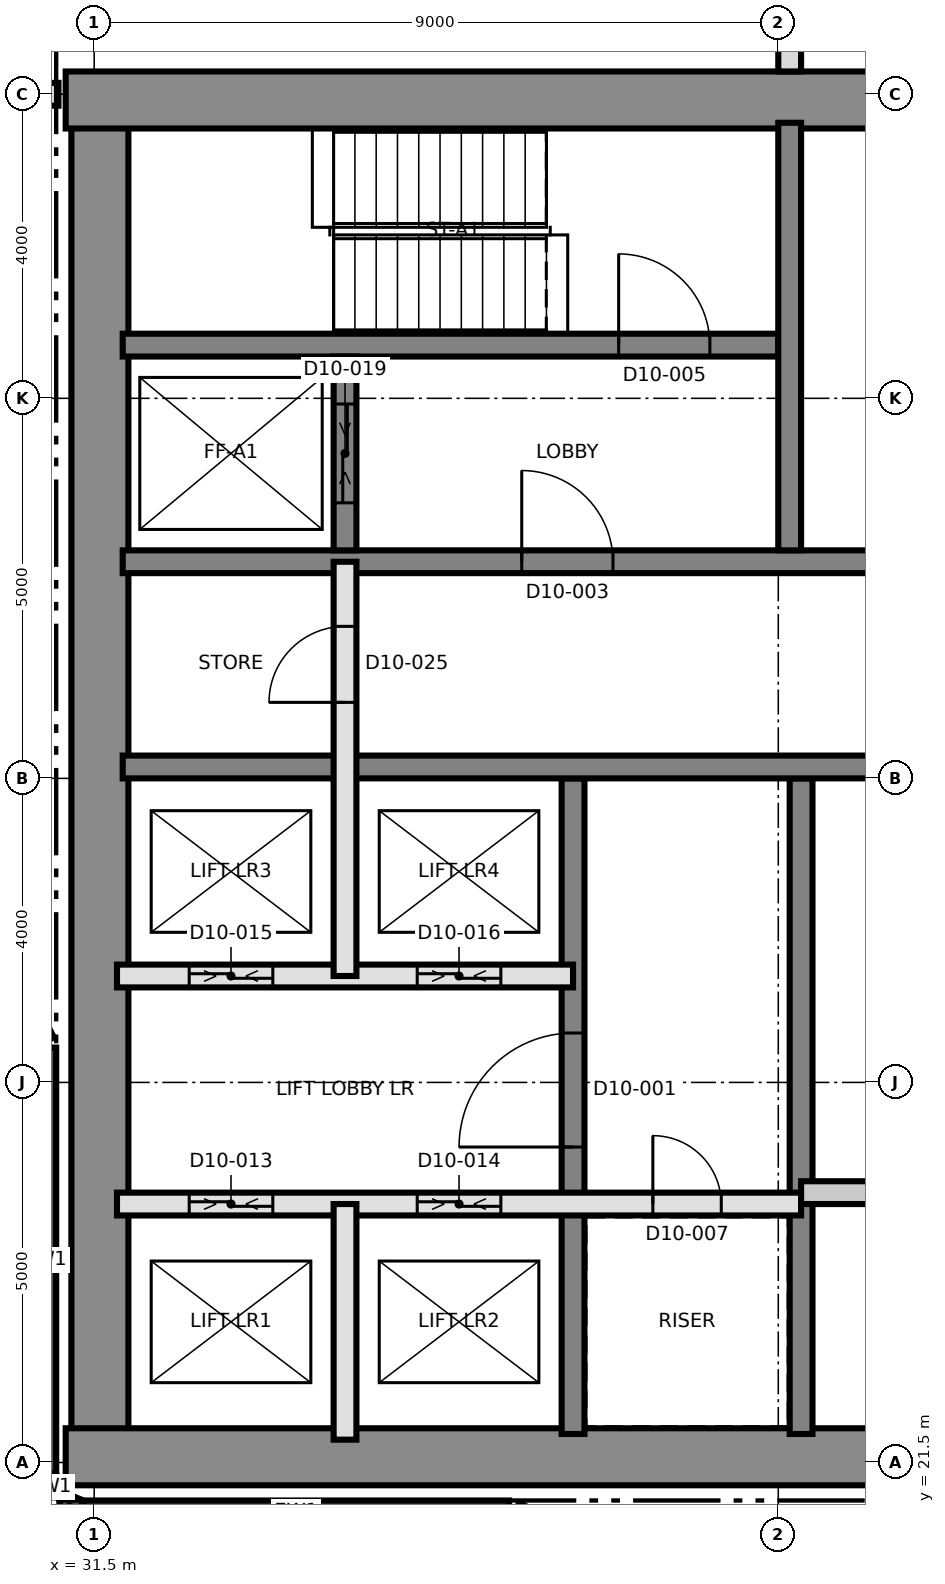
"""IFC4 building model, lengths in metres.
Left out: names, types, materials, properties, quantities, classifications, styles, units other than length and angle.
Written with IfcOpenShell. Run it as: python <this file> out.ifc"""

import sys

from ifc_helpers import new_model, si_unit, direction, frame, frame_2d, origin, place, context, subcontext, project, spatial, rectangle, extrude, element, fill, save


model = new_model("IFC4")
c1 = context("Model", 3, precision=1e-05, world=origin(), true_north=direction((0.0, 1.0)))
c2 = subcontext(c1, "Body", "Model", "MODEL_VIEW")
j1 = project(units=[si_unit("LENGTHUNIT", "METRE"), si_unit("PLANEANGLEUNIT", "RADIAN")], contexts=[c1])
p1 = place(None, origin())
s1 = spatial("IfcSite", under=j1, at=p1, CompositionType="ELEMENT")
p2 = place(p1, origin())
s2 = spatial("IfcBuilding", under=s1, at=p2, CompositionType="ELEMENT")
p3 = place(p2, frame((0.0, 0.0, 120.4)))
s3 = spatial("IfcBuildingStorey", under=s2, at=p3, CompositionType="ELEMENT", Elevation=120.4)
p4 = place(p3, frame((31.575, 21.875, 0.0), z_axis=(0.0, 0.0, 1.0), x_axis=(0.0, 1.0, 0.0)))
e1 = element("IfcWall", 1, at=p4, inside=s3, PredefinedType="SHEAR", context=c2, shape_type="SweptSolid", body=[
    extrude(rectangle(XDim=17.25, YDim=0.75, at=frame_2d((8.625, 0.0))), origin(), (0.0, 0.0, 1.0), 3.7),
])
p5 = place(p3, frame((31.125, 21.575, 0.0), z_axis=(0.0, 0.0, 1.0), x_axis=(1.0, 0.0, 0.0)))
e2 = element("IfcWall", 2, at=p5, inside=s3, PredefinedType="SHEAR", context=c2, shape_type="SweptSolid", body=[
    extrude(rectangle(XDim=27.0, YDim=0.75, at=frame_2d((13.5, 0.0))), origin(), (0.0, 0.0, 1.0), 3.7),
])
p6 = place(p3, frame((31.125, 39.425, 0.0), z_axis=(0.0, 0.0, 1.0), x_axis=(1.0, 0.0, 0.0)))
e3 = element("IfcWall", 3, at=p6, inside=s3, PredefinedType="SHEAR", context=c2, shape_type="SweptSolid", body=[
    extrude(rectangle(XDim=27.0, YDim=0.75, at=frame_2d((13.5, 0.0))), origin(), (0.0, 0.0, 1.0), 3.7),
])
p7 = place(p6, frame((10.575, 0.0, 0.0)))
e4 = element("IfcOpeningElement", 4, at=p7, cuts=e3, PredefinedType="OPENING", context=c2, shape_type="SweptSolid", body=[
    extrude(rectangle(XDim=1.2, YDim=2.1, at=frame_2d((0.6, 1.05))), frame((0.0, 0.385, 0.0), z_axis=(0.0, -1.0, 0.0), x_axis=(1.0, 0.0, 0.0)), (0.0, 0.0, 1.0), 0.77),
])
p8 = place(p3, frame((37.8, 21.875, 0.0), z_axis=(0.0, 0.0, 1.0), x_axis=(0.0, 1.0, 0.0)))
e5 = element("IfcWall", 5, at=p8, inside=s3, PredefinedType="SHEAR", context=c2, shape_type="SweptSolid", body=[
    extrude(rectangle(XDim=8.625, YDim=0.3, at=frame_2d((4.312, 0.0))), origin(), (0.0, 0.0, 1.0), 3.7),
])
p9 = place(p8, frame((3.775, 0.0, 0.0)))
e6 = element("IfcOpeningElement", 6, at=p9, cuts=e5, PredefinedType="OPENING", context=c2, shape_type="SweptSolid", body=[
    extrude(rectangle(XDim=1.5, YDim=2.1, at=frame_2d((0.75, 1.05))), frame((0.0, 0.16, 0.0), z_axis=(0.0, -1.0, 0.0), x_axis=(1.0, 0.0, 0.0)), (0.0, 0.0, 1.0), 0.32),
])
p10 = place(p3, frame((40.8, 21.875, 0.0), z_axis=(0.0, 0.0, 1.0), x_axis=(0.0, 1.0, 0.0)))
e7 = element("IfcWall", 7, at=p10, inside=s3, PredefinedType="SHEAR", context=c2, shape_type="SweptSolid", body=[
    extrude(rectangle(XDim=8.625, YDim=0.3, at=frame_2d((4.312, 0.0))), origin(), (0.0, 0.0, 1.0), 3.7),
])
p11 = place(p3, frame((31.875, 30.65, 0.0), z_axis=(0.0, 0.0, 1.0), x_axis=(1.0, 0.0, 0.0)))
e8 = element("IfcWall", 8, at=p11, inside=s3, PredefinedType="SHEAR", context=c2, shape_type="SweptSolid", body=[
    extrude(rectangle(XDim=26.25, YDim=0.3, at=frame_2d((13.125, 0.0))), origin(), (0.0, 0.0, 1.0), 3.7),
])
p12 = place(p11, frame((24.625, 0.0, 0.0)))
e9 = element("IfcOpeningElement", 9, at=p12, cuts=e8, PredefinedType="OPENING", context=c2, shape_type="SweptSolid", body=[
    extrude(rectangle(XDim=1.0, YDim=2.1, at=frame_2d((0.5, 1.05))), frame((0.0, 0.16, 0.0), z_axis=(0.0, -1.0, 0.0), x_axis=(1.0, 0.0, 0.0)), (0.0, 0.0, 1.0), 0.32),
])
p13 = place(p11, frame((11.425, 0.0, 0.0)))
e10 = element("IfcOpeningElement", 10, at=p13, cuts=e8, PredefinedType="OPENING", context=c2, shape_type="SweptSolid", body=[
    extrude(rectangle(XDim=1.0, YDim=2.1, at=frame_2d((0.5, 1.05))), frame((0.0, 0.16, 0.0), z_axis=(0.0, -1.0, 0.0), x_axis=(1.0, 0.0, 0.0)), (0.0, 0.0, 1.0), 0.32),
])
p14 = place(p3, frame((31.875, 33.35, 0.0), z_axis=(0.0, 0.0, 1.0), x_axis=(1.0, 0.0, 0.0)))
e11 = element("IfcWall", 11, at=p14, inside=s3, PredefinedType="SHEAR", context=c2, shape_type="SweptSolid", body=[
    extrude(rectangle(XDim=26.25, YDim=0.3, at=frame_2d((13.125, 0.0))), origin(), (0.0, 0.0, 1.0), 3.7),
])
p15 = place(p14, frame((13.775, 0.0, 0.0)))
e12 = element("IfcOpeningElement", 12, at=p15, cuts=e11, PredefinedType="OPENING", context=c2, shape_type="SweptSolid", body=[
    extrude(rectangle(XDim=1.4, YDim=2.1, at=frame_2d((0.7, 1.05))), frame((0.0, 0.16, 0.0), z_axis=(0.0, -1.0, 0.0), x_axis=(1.0, 0.0, 0.0)), (0.0, 0.0, 1.0), 0.32),
])
p16 = place(p14, frame((5.25, 0.0, 0.0)))
e13 = element("IfcOpeningElement", 13, at=p16, cuts=e11, PredefinedType="OPENING", context=c2, shape_type="SweptSolid", body=[
    extrude(rectangle(XDim=1.2, YDim=2.1, at=frame_2d((0.6, 1.05))), frame((0.0, 0.16, 0.0), z_axis=(0.0, -1.0, 0.0), x_axis=(1.0, 0.0, 0.0)), (0.0, 0.0, 1.0), 0.32),
])
p17 = place(p14, frame((19.8, 0.0, 0.0)))
e14 = element("IfcOpeningElement", 14, at=p17, cuts=e11, PredefinedType="OPENING", context=c2, shape_type="SweptSolid", body=[
    extrude(rectangle(XDim=1.2, YDim=2.1, at=frame_2d((0.6, 1.05))), frame((0.0, 0.16, 0.0), z_axis=(0.0, -1.0, 0.0), x_axis=(1.0, 0.0, 0.0)), (0.0, 0.0, 1.0), 0.32),
])
p18 = place(p3, frame((31.875, 36.2, 0.0), z_axis=(0.0, 0.0, 1.0), x_axis=(1.0, 0.0, 0.0)))
e15 = element("IfcWall", 15, at=p18, inside=s3, PredefinedType="SHEAR", context=c2, shape_type="SweptSolid", body=[
    extrude(rectangle(XDim=8.625, YDim=0.3, at=frame_2d((4.312, 0.0))), origin(), (0.0, 0.0, 1.0), 3.7),
])
p19 = place(p18, frame((6.525, 0.0, 0.0)))
e16 = element("IfcOpeningElement", 16, at=p19, cuts=e15, PredefinedType="OPENING", context=c2, shape_type="SweptSolid", body=[
    extrude(rectangle(XDim=1.2, YDim=2.1, at=frame_2d((0.6, 1.05))), frame((0.0, 0.16, 0.0), z_axis=(0.0, -1.0, 0.0), x_axis=(1.0, 0.0, 0.0)), (0.0, 0.0, 1.0), 0.32),
])
p20 = place(p3, frame((40.65, 33.5, 0.0), z_axis=(0.0, 0.0, 1.0), x_axis=(0.0, 1.0, 0.0)))
e17 = element("IfcWall", 17, at=p20, inside=s3, PredefinedType="SHEAR", context=c2, shape_type="SweptSolid", body=[
    extrude(rectangle(XDim=5.625, YDim=0.3, at=frame_2d((2.812, 0.0))), origin(), (0.0, 0.0, 1.0), 3.7),
])
p21 = place(p3, frame((34.8, 33.5, 0.0), z_axis=(0.0, 0.0, 1.0), x_axis=(0.0, 1.0, 0.0)))
e18 = element("IfcWall", 18, at=p21, inside=s3, PredefinedType="SHEAR", context=c2, shape_type="SweptSolid", body=[
    extrude(rectangle(XDim=2.55, YDim=0.3, at=frame_2d((1.275, 0.0))), origin(), (0.0, 0.0, 1.0), 3.7),
])
p22 = place(p21, frame((0.625, 0.0, 0.0)))
e19 = element("IfcOpeningElement", 19, at=p22, cuts=e18, PredefinedType="OPENING", context=c2, shape_type="SweptSolid", body=[
    extrude(rectangle(XDim=1.3, YDim=2.4, at=frame_2d((0.65, 1.2))), frame((0.0, 0.16, 0.0), z_axis=(0.0, -1.0, 0.0), x_axis=(1.0, 0.0, 0.0)), (0.0, 0.0, 1.0), 0.32),
])
p23 = place(p3, frame((30.85, 26.959, 0.0), z_axis=(0.0, 0.0, 1.0), x_axis=(0.0, -1.0, 0.0)))
e20 = element("IfcWall", 20, at=p23, inside=s3, PredefinedType="SOLIDWALL", context=c2, shape_type="SweptSolid", body=[
    extrude(rectangle(XDim=5.599, YDim=0.3, at=frame_2d((2.8, 0.0))), origin(), (0.0, 0.0, 1.0), 3.4),
])
for number, where, z_axis, x_axis in (
    (21, (30.861, 21.302, 0.0), (0.0, 0.0, 1.0), (0.383, -0.924, 0.0)),
    (22, (31.048, 20.967, 0.0), (0.0, 0.0, 1.0), (0.924, -0.383, 0.0)),
):
    element("IfcWall", number, at=place(p3, frame(where, z_axis=z_axis, x_axis=x_axis)), inside=s3, PredefinedType="SOLIDWALL", context=c2, shape_type="SweptSolid", body=[
        extrude(rectangle(XDim=0.275, YDim=0.3, at=frame_2d((0.138, 0.0))), origin(), (0.0, 0.0, 1.0), 3.4),
    ])
p24 = place(p3, frame((31.36, 20.85, 0.0), z_axis=(0.0, 0.0, 1.0), x_axis=(1.0, 0.0, 0.0)))
e23 = element("IfcWall", 23, at=p24, inside=s3, PredefinedType="SOLIDWALL", context=c2, shape_type="SweptSolid", body=[
    extrude(rectangle(XDim=5.599, YDim=0.3, at=frame_2d((2.8, 0.0))), origin(), (0.0, 0.0, 1.0), 3.4),
])
for number, where, z_axis, x_axis in (
    (24, (37.025, 20.834, 0.0), (0.0, 0.0, 1.0), (0.897, -0.442, 0.0)),
    (25, (30.216, 28.28, 0.0), (0.0, 0.0, 1.0), (0.442, -0.897, 0.0)),
):
    element("IfcWall", number, at=place(p3, frame(where, z_axis=z_axis, x_axis=x_axis)), inside=s3, PredefinedType="SOLIDWALL", context=c2, shape_type="SweptSolid", body=[
        extrude(rectangle(XDim=1.399, YDim=0.3, at=frame_2d((0.7, 0.0))), origin(), (0.0, 0.0, 1.0), 3.4),
    ])
p25 = place(p3, frame((31.8, 24.9, 0.0), z_axis=(0.0, 0.0, 1.0), x_axis=(1.0, 0.0, 0.0)))
e26 = element("IfcWall", 26, at=p25, inside=s3, PredefinedType="SOLIDWALL", context=c2, shape_type="SweptSolid", body=[
    extrude(rectangle(XDim=9.0, YDim=0.3, at=frame_2d((4.5, 0.0))), origin(), (0.0, 0.0, 1.0), 3.4),
])
p26 = place(p25, frame((7.05, 0.0, 0.0)))
e27 = element("IfcOpeningElement", 27, at=p26, cuts=e26, PredefinedType="OPENING", context=c2, shape_type="SweptSolid", body=[
    extrude(rectangle(XDim=0.9, YDim=2.1, at=frame_2d((0.45, 1.05))), frame((0.0, 0.16, 0.0), z_axis=(0.0, -1.0, 0.0), x_axis=(1.0, 0.0, 0.0)), (0.0, 0.0, 1.0), 0.32),
])
p27 = place(p25, frame((0.95, 0.0, 0.0)))
e28 = element("IfcOpeningElement", 28, at=p27, cuts=e26, PredefinedType="OPENING", context=c2, shape_type="SweptSolid", body=[
    extrude(rectangle(XDim=1.1, YDim=2.4, at=frame_2d((0.55, 1.2))), frame((0.0, 0.16, 0.0), z_axis=(0.0, -1.0, 0.0), x_axis=(1.0, 0.0, 0.0)), (0.0, 0.0, 1.0), 0.32),
])
p28 = place(p25, frame((3.95, 0.0, 0.0)))
e29 = element("IfcOpeningElement", 29, at=p28, cuts=e26, PredefinedType="OPENING", context=c2, shape_type="SweptSolid", body=[
    extrude(rectangle(XDim=1.1, YDim=2.4, at=frame_2d((0.55, 1.2))), frame((0.0, 0.16, 0.0), z_axis=(0.0, -1.0, 0.0), x_axis=(1.0, 0.0, 0.0)), (0.0, 0.0, 1.0), 0.32),
])
p29 = place(p3, frame((40.8, 25.05, 0.0), z_axis=(0.0, 0.0, 1.0), x_axis=(1.0, 0.0, 0.0)))
e30 = element("IfcWall", 30, at=p29, inside=s3, PredefinedType="PARTITIONING", context=c2, shape_type="SweptSolid", body=[
    extrude(rectangle(XDim=6.0, YDim=0.3, at=frame_2d((3.0, 0.0))), origin(), (0.0, 0.0, 1.0), 3.4),
])
p30 = place(p29, frame((2.5, 0.0, 0.0)))
e31 = element("IfcOpeningElement", 31, at=p30, cuts=e30, PredefinedType="OPENING", context=c2, shape_type="SweptSolid", body=[
    extrude(rectangle(XDim=1.0, YDim=2.1, at=frame_2d((0.5, 1.05))), frame((0.0, 0.16, 0.0), z_axis=(0.0, -1.0, 0.0), x_axis=(1.0, 0.0, 0.0)), (0.0, 0.0, 1.0), 0.32),
])
p31 = place(p3, frame((31.8, 27.9, 0.0), z_axis=(0.0, 0.0, 1.0), x_axis=(1.0, 0.0, 0.0)))
e32 = element("IfcWall", 32, at=p31, inside=s3, PredefinedType="SOLIDWALL", context=c2, shape_type="SweptSolid", body=[
    extrude(rectangle(XDim=6.0, YDim=0.3, at=frame_2d((3.0, 0.0))), origin(), (0.0, 0.0, 1.0), 3.4),
])
p32 = place(p31, frame((0.95, 0.0, 0.0)))
e33 = element("IfcOpeningElement", 33, at=p32, cuts=e32, PredefinedType="OPENING", context=c2, shape_type="SweptSolid", body=[
    extrude(rectangle(XDim=1.1, YDim=2.4, at=frame_2d((0.55, 1.2))), frame((0.0, 0.16, 0.0), z_axis=(0.0, -1.0, 0.0), x_axis=(1.0, 0.0, 0.0)), (0.0, 0.0, 1.0), 0.32),
])
p33 = place(p31, frame((3.95, 0.0, 0.0)))
e34 = element("IfcOpeningElement", 34, at=p33, cuts=e32, PredefinedType="OPENING", context=c2, shape_type="SweptSolid", body=[
    extrude(rectangle(XDim=1.1, YDim=2.4, at=frame_2d((0.55, 1.2))), frame((0.0, 0.16, 0.0), z_axis=(0.0, -1.0, 0.0), x_axis=(1.0, 0.0, 0.0)), (0.0, 0.0, 1.0), 0.32),
])
p34 = place(p3, frame((34.8, 21.8, 0.0), z_axis=(0.0, 0.0, 1.0), x_axis=(0.0, 1.0, 0.0)))
e35 = element("IfcWall", 35, at=p34, inside=s3, PredefinedType="SOLIDWALL", context=c2, shape_type="SweptSolid", body=[
    extrude(rectangle(XDim=3.1, YDim=0.3, at=frame_2d((1.55, 0.0))), origin(), (0.0, 0.0, 1.0), 3.4),
])
p35 = place(p3, frame((34.8, 27.9, 0.0), z_axis=(0.0, 0.0, 1.0), x_axis=(0.0, 1.0, 0.0)))
e36 = element("IfcWall", 36, at=p35, inside=s3, PredefinedType="SOLIDWALL", context=c2, shape_type="SweptSolid", body=[
    extrude(rectangle(XDim=5.45, YDim=0.3, at=frame_2d((2.725, 0.0))), origin(), (0.0, 0.0, 1.0), 3.4),
])
p36 = place(p35, frame((3.6, 0.0, 0.0)))
e37 = element("IfcOpeningElement", 37, at=p36, cuts=e36, PredefinedType="OPENING", context=c2, shape_type="SweptSolid", body=[
    extrude(rectangle(XDim=1.0, YDim=2.1, at=frame_2d((0.5, 1.05))), frame((0.0, 0.16, 0.0), z_axis=(0.0, -1.0, 0.0), x_axis=(1.0, 0.0, 0.0)), (0.0, 0.0, 1.0), 0.32),
])
p37 = place(p3, frame((29.275, 39.5, 0.0), z_axis=(0.0, 0.0, 1.0), x_axis=(1.0, 0.0, 0.0)))
e38 = element("IfcWall", 38, at=p37, inside=s3, PredefinedType="PARTITIONING", context=c2, shape_type="SweptSolid", body=[
    extrude(rectangle(XDim=1.755, YDim=0.3, at=frame_2d((0.877, 0.0))), origin(), (0.0, 0.0, 1.0), 3.35),
])
p38 = place(p3, frame((40.65, 39.8, 0.0), z_axis=(0.0, 0.0, 1.0), x_axis=(0.0, 1.0, 0.0)))
e39 = element("IfcWall", 39, at=p38, inside=s3, PredefinedType="PARTITIONING", context=c2, shape_type="SweptSolid", body=[
    extrude(rectangle(XDim=37.2, YDim=0.3, at=frame_2d((18.6, 0.0))), origin(), (0.0, 0.0, 1.0), 3.35),
])
p39 = place(p38, frame((0.835, 0.0, 0.0)))
e40 = element("IfcOpeningElement", 40, at=p39, cuts=e39, PredefinedType="OPENING", context=c2, shape_type="SweptSolid", body=[
    extrude(rectangle(XDim=1.2, YDim=2.1, at=frame_2d((0.6, 1.05))), frame((0.0, 0.16, 0.0), z_axis=(0.0, -1.0, 0.0), x_axis=(1.0, 0.0, 0.0)), (0.0, 0.0, 1.0), 0.32),
])
p40 = place(p38, frame((4.085, 0.0, 0.0)))
e41 = element("IfcOpeningElement", 41, at=p40, cuts=e39, PredefinedType="OPENING", context=c2, shape_type="SweptSolid", body=[
    extrude(rectangle(XDim=1.0, YDim=2.1, at=frame_2d((0.5, 1.05))), frame((0.0, 0.16, 0.0), z_axis=(0.0, -1.0, 0.0), x_axis=(1.0, 0.0, 0.0)), (0.0, 0.0, 1.0), 0.32),
])
p41 = place(p38, frame((9.835, 0.0, 0.0)))
e42 = element("IfcOpeningElement", 42, at=p41, cuts=e39, PredefinedType="OPENING", context=c2, shape_type="SweptSolid", body=[
    extrude(rectangle(XDim=1.2, YDim=2.1, at=frame_2d((0.6, 1.05))), frame((0.0, 0.16, 0.0), z_axis=(0.0, -1.0, 0.0), x_axis=(1.0, 0.0, 0.0)), (0.0, 0.0, 1.0), 0.32),
])
p42 = place(p38, frame((13.085, 0.0, 0.0)))
e43 = element("IfcOpeningElement", 43, at=p42, cuts=e39, PredefinedType="OPENING", context=c2, shape_type="SweptSolid", body=[
    extrude(rectangle(XDim=1.0, YDim=2.1, at=frame_2d((0.5, 1.05))), frame((0.0, 0.16, 0.0), z_axis=(0.0, -1.0, 0.0), x_axis=(1.0, 0.0, 0.0)), (0.0, 0.0, 1.0), 0.32),
])
p43 = place(p38, frame((21.2, 0.0, 0.0)))
e44 = element("IfcOpeningElement", 44, at=p43, cuts=e39, PredefinedType="OPENING", context=c2, shape_type="SweptSolid", body=[
    extrude(rectangle(XDim=1.0, YDim=2.4, at=frame_2d((0.5, 1.2))), frame((0.0, 0.16, 0.0), z_axis=(0.0, -1.0, 0.0), x_axis=(1.0, 0.0, 0.0)), (0.0, 0.0, 1.0), 0.32),
])
p44 = place(p9, origin())
e45 = element("IfcDoor", 45, at=p44, inside=s3, OperationType="SINGLE_SWING_LEFT", PredefinedType="DOOR", context=c2, shape_type="SweptSolid", body=[
    extrude(rectangle(XDim=1.5, YDim=2.1, at=frame_2d((0.75, 1.05))), frame((0.0, 0.025, 0.0), z_axis=(0.0, -1.0, 0.0), x_axis=(1.0, 0.0, 0.0)), (0.0, 0.0, 1.0), 0.05),
])
fill(e6, e45)
p45 = place(p16, origin())
e46 = element("IfcDoor", 46, at=p45, inside=s3, OperationType="SINGLE_SWING_LEFT", PredefinedType="DOOR", context=c2, shape_type="SweptSolid", body=[
    extrude(rectangle(XDim=1.2, YDim=2.1, at=frame_2d((0.6, 1.05))), frame((0.0, 0.025, 0.0), z_axis=(0.0, -1.0, 0.0), x_axis=(1.0, 0.0, 0.0)), (0.0, 0.0, 1.0), 0.05),
])
fill(e13, e46)
p46 = place(p19, origin())
e47 = element("IfcDoor", 47, at=p46, inside=s3, OperationType="SINGLE_SWING_RIGHT", PredefinedType="DOOR", context=c2, shape_type="SweptSolid", body=[
    extrude(rectangle(XDim=1.2, YDim=2.1, at=frame_2d((0.6, 1.05))), frame((0.0, 0.025, 0.0), z_axis=(0.0, -1.0, 0.0), x_axis=(1.0, 0.0, 0.0)), (0.0, 0.0, 1.0), 0.05),
])
fill(e16, e47)
p47 = place(p26, origin())
e48 = element("IfcDoor", 48, at=p47, inside=s3, OperationType="SINGLE_SWING_LEFT", PredefinedType="DOOR", context=c2, shape_type="SweptSolid", body=[
    extrude(rectangle(XDim=0.9, YDim=2.1, at=frame_2d((0.45, 1.05))), frame((0.0, 0.025, 0.0), z_axis=(0.0, -1.0, 0.0), x_axis=(1.0, 0.0, 0.0)), (0.0, 0.0, 1.0), 0.05),
])
fill(e27, e48)
p48 = place(p27, origin())
e49 = element("IfcDoor", 49, at=p48, inside=s3, OperationType="SLIDING_TO_LEFT", PredefinedType="DOOR", context=c2, shape_type="SweptSolid", body=[
    extrude(rectangle(XDim=1.1, YDim=2.4, at=frame_2d((0.55, 1.2))), frame((0.0, 0.025, 0.0), z_axis=(0.0, -1.0, 0.0), x_axis=(1.0, 0.0, 0.0)), (0.0, 0.0, 1.0), 0.05),
])
fill(e28, e49)
p49 = place(p28, origin())
e50 = element("IfcDoor", 50, at=p49, inside=s3, OperationType="SLIDING_TO_LEFT", PredefinedType="DOOR", context=c2, shape_type="SweptSolid", body=[
    extrude(rectangle(XDim=1.1, YDim=2.4, at=frame_2d((0.55, 1.2))), frame((0.0, 0.025, 0.0), z_axis=(0.0, -1.0, 0.0), x_axis=(1.0, 0.0, 0.0)), (0.0, 0.0, 1.0), 0.05),
])
fill(e29, e50)
p50 = place(p32, origin())
e51 = element("IfcDoor", 51, at=p50, inside=s3, OperationType="SLIDING_TO_LEFT", PredefinedType="DOOR", context=c2, shape_type="SweptSolid", body=[
    extrude(rectangle(XDim=1.1, YDim=2.4, at=frame_2d((0.55, 1.2))), frame((0.0, 0.025, 0.0), z_axis=(0.0, -1.0, 0.0), x_axis=(1.0, 0.0, 0.0)), (0.0, 0.0, 1.0), 0.05),
])
fill(e33, e51)
p51 = place(p33, origin())
e52 = element("IfcDoor", 52, at=p51, inside=s3, OperationType="SLIDING_TO_LEFT", PredefinedType="DOOR", context=c2, shape_type="SweptSolid", body=[
    extrude(rectangle(XDim=1.1, YDim=2.4, at=frame_2d((0.55, 1.2))), frame((0.0, 0.025, 0.0), z_axis=(0.0, -1.0, 0.0), x_axis=(1.0, 0.0, 0.0)), (0.0, 0.0, 1.0), 0.05),
])
fill(e34, e52)
p52 = place(p22, origin())
e53 = element("IfcDoor", 53, at=p52, inside=s3, OperationType="SLIDING_TO_LEFT", PredefinedType="DOOR", context=c2, shape_type="SweptSolid", body=[
    extrude(rectangle(XDim=1.3, YDim=2.4, at=frame_2d((0.65, 1.2))), frame((0.0, 0.025, 0.0), z_axis=(0.0, -1.0, 0.0), x_axis=(1.0, 0.0, 0.0)), (0.0, 0.0, 1.0), 0.05),
])
fill(e19, e53)
p53 = place(p36, origin())
e54 = element("IfcDoor", 54, at=p53, inside=s3, OperationType="SINGLE_SWING_LEFT", PredefinedType="DOOR", context=c2, shape_type="SweptSolid", body=[
    extrude(rectangle(XDim=1.0, YDim=2.1, at=frame_2d((0.5, 1.05))), frame((0.0, 0.025, 0.0), z_axis=(0.0, -1.0, 0.0), x_axis=(1.0, 0.0, 0.0)), (0.0, 0.0, 1.0), 0.05),
])
fill(e37, e54)
save(model, sys.argv[1])
